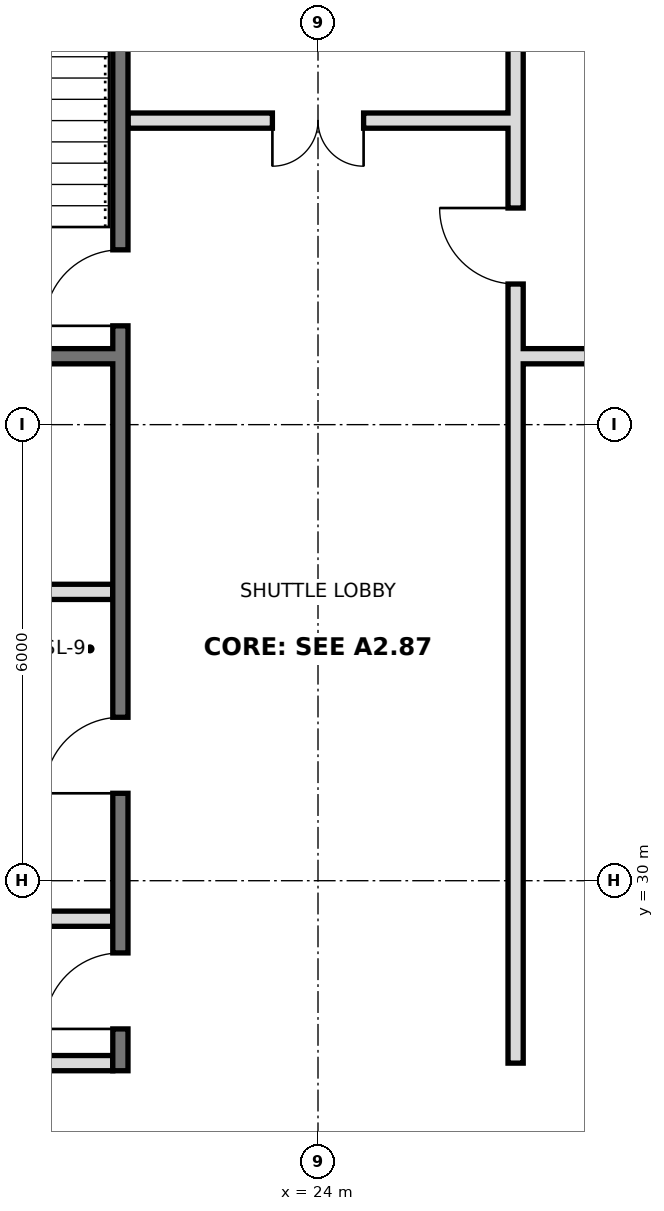
"""IFC4 building model, lengths in metres.
Left out: names, types, materials, properties, quantities, classifications, styles, units other than length and angle.
Written with IfcOpenShell. Run it as: python <this file> out.ifc"""

import sys

from ifc_helpers import new_model, si_unit, direction, frame, frame_2d, origin, place, context, subcontext, project, spatial, rectangle, extrude, element, fill, save


model = new_model("IFC4")
c1 = context("Model", 3, precision=1e-05, world=origin(), true_north=direction((0.0, 1.0)))
c2 = subcontext(c1, "Body", "Model", "MODEL_VIEW")
j1 = project(units=[si_unit("LENGTHUNIT", "METRE"), si_unit("PLANEANGLEUNIT", "RADIAN")], contexts=[c1])
p1 = place(None, origin())
s1 = spatial("IfcSite", under=j1, at=p1, CompositionType="ELEMENT")
p2 = place(p1, origin())
s2 = spatial("IfcBuilding", under=s1, at=p2, CompositionType="ELEMENT")
p3 = place(p2, frame((0.0, 0.0, 349.8)))
s3 = spatial("IfcBuildingStorey", under=s2, at=p3, CompositionType="ELEMENT", Elevation=349.8)
p4 = place(p3, frame((21.4, 27.5, 0.0), z_axis=(0.0, 0.0, 1.0), x_axis=(0.0, 1.0, 0.0)))
e1 = element("IfcWall", 1, at=p4, inside=s3, PredefinedType="SOLIDWALL", context=c2, shape_type="SweptSolid", body=[
    extrude(rectangle(XDim=17.5, YDim=0.2, at=frame_2d((8.75, 0.0))), origin(), (0.0, 0.0, 1.0), 3.75),
])
p5 = place(p4, frame((0.55, 0.0, 0.0)))
e2 = element("IfcOpeningElement", 2, at=p5, cuts=e1, PredefinedType="OPENING", context=c2, shape_type="SweptSolid", body=[
    extrude(rectangle(XDim=1.0, YDim=2.1, at=frame_2d((0.5, 1.05))), frame((0.0, 0.11, 0.0), z_axis=(0.0, -1.0, 0.0), x_axis=(1.0, 0.0, 0.0)), (0.0, 0.0, 1.0), 0.22),
])
p6 = place(p4, frame((3.65, 0.0, 0.0)))
e3 = element("IfcOpeningElement", 3, at=p6, cuts=e1, PredefinedType="OPENING", context=c2, shape_type="SweptSolid", body=[
    extrude(rectangle(XDim=1.0, YDim=2.1, at=frame_2d((0.5, 1.05))), frame((0.0, 0.11, 0.0), z_axis=(0.0, -1.0, 0.0), x_axis=(1.0, 0.0, 0.0)), (0.0, 0.0, 1.0), 0.22),
])
p7 = place(p4, frame((9.8, 0.0, 0.0)))
e4 = element("IfcOpeningElement", 4, at=p7, cuts=e1, PredefinedType="OPENING", context=c2, shape_type="SweptSolid", body=[
    extrude(rectangle(XDim=1.0, YDim=2.1, at=frame_2d((0.5, 1.05))), frame((0.0, 0.11, 0.0), z_axis=(0.0, -1.0, 0.0), x_axis=(1.0, 0.0, 0.0)), (0.0, 0.0, 1.0), 0.22),
])
p8 = place(p3, frame((26.6, 27.6, 0.0), z_axis=(0.0, 0.0, 1.0), x_axis=(0.0, 1.0, 0.0)))
e5 = element("IfcWall", 5, at=p8, inside=s3, PredefinedType="PARTITIONING", context=c2, shape_type="SweptSolid", body=[
    extrude(rectangle(XDim=17.4, YDim=0.2, at=frame_2d((8.7, 0.0))), origin(), (0.0, 0.0, 1.0), 3.75),
])
p9 = place(p8, frame((10.25, 0.0, 0.0)))
e6 = element("IfcOpeningElement", 6, at=p9, cuts=e5, PredefinedType="OPENING", context=c2, shape_type="SweptSolid", body=[
    extrude(rectangle(XDim=1.0, YDim=2.1, at=frame_2d((0.5, 1.05))), frame((0.0, 0.11, 0.0), z_axis=(0.0, -1.0, 0.0), x_axis=(1.0, 0.0, 0.0)), (0.0, 0.0, 1.0), 0.22),
])
for number, where, z_axis, x_axis in (
    (7, (18.6, 27.6, 0.0), (0.0, 0.0, 1.0), (1.0, 0.0, 0.0)),
    (8, (18.6, 29.5, 0.0), (0.0, 0.0, 1.0), (1.0, 0.0, 0.0)),
    (9, (18.6, 33.8, 0.0), (0.0, 0.0, 1.0), (1.0, 0.0, 0.0)),
):
    element("IfcWall", number, at=place(p3, frame(where, z_axis=z_axis, x_axis=x_axis)), inside=s3, PredefinedType="PARTITIONING", context=c2, shape_type="SweptSolid", body=[
        extrude(rectangle(XDim=2.7, YDim=0.2, at=frame_2d((1.35, 0.0))), origin(), (0.0, 0.0, 1.0), 3.75),
    ])
p10 = place(p3, frame((18.6, 36.9, 0.0), z_axis=(0.0, 0.0, 1.0), x_axis=(1.0, 0.0, 0.0)))
e10 = element("IfcWall", 10, at=p10, inside=s3, PredefinedType="SOLIDWALL", context=c2, shape_type="SweptSolid", body=[
    extrude(rectangle(XDim=2.7, YDim=0.2, at=frame_2d((1.35, 0.0))), origin(), (0.0, 0.0, 1.0), 3.75),
])
p11 = place(p3, frame((26.7, 36.9, 0.0), z_axis=(0.0, 0.0, 1.0), x_axis=(1.0, 0.0, 0.0)))
e11 = element("IfcWall", 11, at=p11, inside=s3, PredefinedType="PARTITIONING", context=c2, shape_type="SweptSolid", body=[
    extrude(rectangle(XDim=2.7, YDim=0.2, at=frame_2d((1.35, 0.0))), origin(), (0.0, 0.0, 1.0), 3.75),
])
p12 = place(p3, frame((21.5, 40.0, 0.0), z_axis=(0.0, 0.0, 1.0), x_axis=(1.0, 0.0, 0.0)))
e12 = element("IfcWall", 12, at=p12, inside=s3, PredefinedType="PARTITIONING", context=c2, shape_type="SweptSolid", body=[
    extrude(rectangle(XDim=5.0, YDim=0.2, at=frame_2d((2.5, 0.0))), origin(), (0.0, 0.0, 1.0), 3.75),
])
p13 = place(p12, frame((1.9, 0.0, 0.0)))
e13 = element("IfcOpeningElement", 13, at=p13, cuts=e12, PredefinedType="OPENING", context=c2, shape_type="SweptSolid", body=[
    extrude(rectangle(XDim=1.2, YDim=2.1, at=frame_2d((0.6, 1.05))), frame((0.0, 0.11, 0.0), z_axis=(0.0, -1.0, 0.0), x_axis=(1.0, 0.0, 0.0)), (0.0, 0.0, 1.0), 0.22),
])
p14 = place(p13, frame((1.2, 0.0, 0.0), z_axis=(0.0, 0.0, 1.0), x_axis=(-1.0, 0.0, 0.0)))
e14 = element("IfcDoor", 14, at=p14, inside=s3, OperationType="DOUBLE_DOOR_SINGLE_SWING", PredefinedType="DOOR", context=c2, shape_type="SweptSolid", body=[
    extrude(rectangle(XDim=1.2, YDim=2.1, at=frame_2d((0.6, 1.05))), frame((0.0, 0.025, 0.0), z_axis=(0.0, -1.0, 0.0), x_axis=(1.0, 0.0, 0.0)), (0.0, 0.0, 1.0), 0.05),
])
fill(e13, e14)
p15 = place(p5, origin())
e15 = element("IfcDoor", 15, at=p15, inside=s3, OperationType="SINGLE_SWING_LEFT", PredefinedType="DOOR", context=c2, shape_type="SweptSolid", body=[
    extrude(rectangle(XDim=1.0, YDim=2.1, at=frame_2d((0.5, 1.05))), frame((0.0, 0.025, 0.0), z_axis=(0.0, -1.0, 0.0), x_axis=(1.0, 0.0, 0.0)), (0.0, 0.0, 1.0), 0.05),
])
fill(e2, e15)
p16 = place(p6, origin())
e16 = element("IfcDoor", 16, at=p16, inside=s3, OperationType="SINGLE_SWING_LEFT", PredefinedType="DOOR", context=c2, shape_type="SweptSolid", body=[
    extrude(rectangle(XDim=1.0, YDim=2.1, at=frame_2d((0.5, 1.05))), frame((0.0, 0.025, 0.0), z_axis=(0.0, -1.0, 0.0), x_axis=(1.0, 0.0, 0.0)), (0.0, 0.0, 1.0), 0.05),
])
fill(e3, e16)
p17 = place(p7, origin())
e17 = element("IfcDoor", 17, at=p17, inside=s3, OperationType="SINGLE_SWING_LEFT", PredefinedType="DOOR", context=c2, shape_type="SweptSolid", body=[
    extrude(rectangle(XDim=1.0, YDim=2.1, at=frame_2d((0.5, 1.05))), frame((0.0, 0.025, 0.0), z_axis=(0.0, -1.0, 0.0), x_axis=(1.0, 0.0, 0.0)), (0.0, 0.0, 1.0), 0.05),
])
fill(e4, e17)
p18 = place(p9, frame((1.0, 0.0, 0.0), z_axis=(0.0, 0.0, 1.0), x_axis=(-1.0, 0.0, 0.0)))
e18 = element("IfcDoor", 18, at=p18, inside=s3, OperationType="SINGLE_SWING_LEFT", PredefinedType="DOOR", context=c2, shape_type="SweptSolid", body=[
    extrude(rectangle(XDim=1.0, YDim=2.1, at=frame_2d((0.5, 1.05))), frame((0.0, 0.025, 0.0), z_axis=(0.0, -1.0, 0.0), x_axis=(1.0, 0.0, 0.0)), (0.0, 0.0, 1.0), 0.05),
])
fill(e6, e18)
save(model, sys.argv[1])
